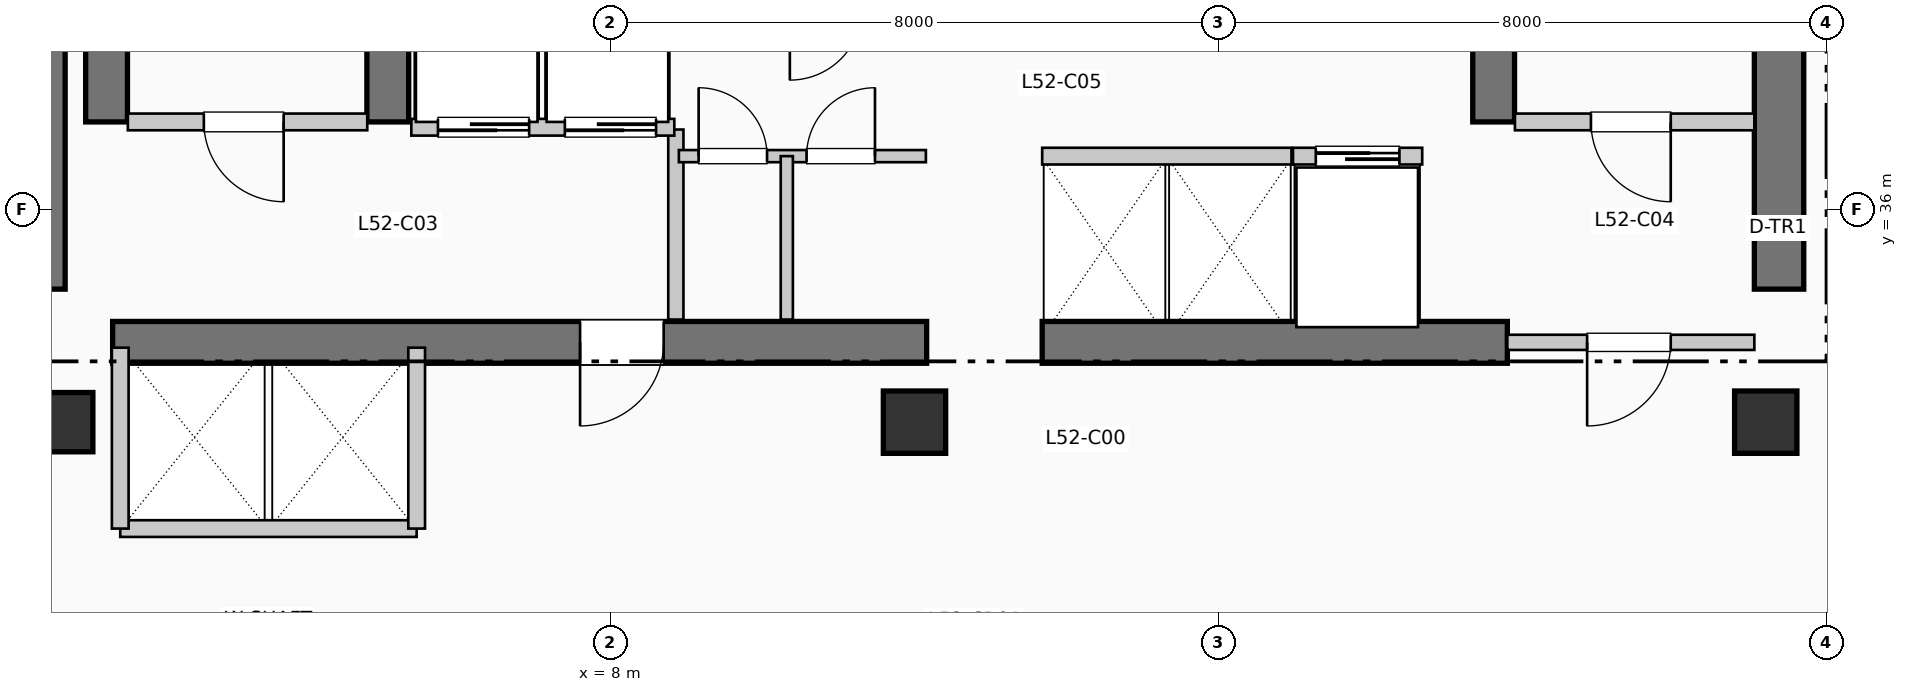
"""IFC4 building model, lengths in metres.
Left out: names, types, materials, properties, quantities, classifications, styles, units other than length and angle.
Written with IfcOpenShell. Run it as: python <this file> out.ifc"""

import sys

from ifc_helpers import new_model, si_unit, direction, frame, frame_2d, origin, origin_2d, place, context, subcontext, project, spatial, rectangle, extrude, element, fill, save


model = new_model("IFC4")
c1 = context("Model", 3, precision=1e-05, world=origin(), true_north=direction((0.0, 1.0)))
c2 = subcontext(c1, "Body", "Model", "MODEL_VIEW")
j1 = project(units=[si_unit("LENGTHUNIT", "METRE"), si_unit("PLANEANGLEUNIT", "RADIAN")], contexts=[c1])
p1 = place(None, origin())
s1 = spatial("IfcSite", under=j1, at=p1, CompositionType="ELEMENT")
p2 = place(p1, origin())
s2 = spatial("IfcBuilding", under=s1, at=p2, CompositionType="ELEMENT")
p3 = place(p2, frame((0.0, 0.0, 215.16)))
s3 = spatial("IfcBuildingStorey", under=s2, at=p3, CompositionType="ELEMENT", Elevation=215.16)
p4 = place(p3, frame((0.5, 34.95, 0.0), z_axis=(0.0, 0.0, 1.0), x_axis=(0.0, 1.0, 0.0)))
e1 = element("IfcWall", 1, at=p4, inside=s3, PredefinedType="SHEAR", context=c2, shape_type="SweptSolid", body=[
    extrude(rectangle(XDim=7.9, YDim=0.65, at=frame_2d((3.95, 0.0))), origin(), (0.0, 0.0, 1.0), 4.62),
])
p5 = place(p3, frame((23.375, 34.95, 0.0), z_axis=(0.0, 0.0, 1.0), x_axis=(0.0, 1.0, 0.0)))
e2 = element("IfcWall", 2, at=p5, inside=s3, PredefinedType="SHEAR", context=c2, shape_type="SweptSolid", body=[
    extrude(rectangle(XDim=10.64, YDim=0.65, at=frame_2d((5.32, 0.0))), origin(), (0.0, 0.0, 1.0), 4.62),
])
p6 = place(p3, frame((1.45, 34.25, 0.0), z_axis=(0.0, 0.0, 1.0), x_axis=(1.0, 0.0, 0.0)))
e3 = element("IfcWall", 3, at=p6, inside=s3, PredefinedType="SHEAR", context=c2, shape_type="SweptSolid", body=[
    extrude(rectangle(XDim=10.71, YDim=0.55, at=frame_2d((5.355, 0.0))), origin(), (0.0, 0.0, 1.0), 4.62),
])
p7 = place(p6, frame((7.25, 0.0, 0.0), z_axis=(0.0, 0.0, 1.0), x_axis=(-1.0, 0.0, 0.0)))
e4 = element("IfcOpeningElement", 4, at=p7, cuts=e3, PredefinedType="OPENING", context=c2, shape_type="SweptSolid", body=[
    extrude(rectangle(XDim=1.1, YDim=2.15, at=frame_2d((0.55, 1.075))), frame((0.0, 0.285, 0.0), z_axis=(0.0, -1.0, 0.0), x_axis=(1.0, 0.0, 0.0)), (0.0, 0.0, 1.0), 0.57),
])
p8 = place(p3, frame((13.68, 34.25, 0.0), z_axis=(0.0, 0.0, 1.0), x_axis=(1.0, 0.0, 0.0)))
e5 = element("IfcWall", 5, at=p8, inside=s3, PredefinedType="SHEAR", context=c2, shape_type="SweptSolid", body=[
    extrude(rectangle(XDim=6.12, YDim=0.55, at=frame_2d((3.06, 0.0))), origin(), (0.0, 0.0, 1.0), 4.62),
])
for number, where, z_axis, x_axis in (
    (6, (1.37, 37.15, 0.0), (0.0, 0.0, 1.0), (0.0, 1.0, 0.0)),
    (7, (5.07, 37.15, 0.0), (0.0, 0.0, 1.0), (0.0, 1.0, 0.0)),
    (8, (19.62, 37.15, 0.0), (0.0, 0.0, 1.0), (0.0, 1.0, 0.0)),
):
    element("IfcWall", number, at=place(p3, frame(where, z_axis=z_axis, x_axis=x_axis)), inside=s3, PredefinedType="SHEAR", context=c2, shape_type="SweptSolid", body=[
        extrude(rectangle(XDim=7.89, YDim=0.55, at=frame_2d((3.945, 0.0))), origin(), (0.0, 0.0, 1.0), 4.62),
    ])
p9 = place(p3, frame((0.8, 33.2, 0.0), z_axis=(0.0, 0.0, 1.0), x_axis=(1.0, 0.0, 0.0)))
e9 = element("IfcColumn", 9, at=p9, inside=s3, PredefinedType="COLUMN", context=c2, shape_type="SweptSolid", body=[
    extrude(rectangle(XDim=0.78, YDim=0.78, at=origin_2d()), origin(), (0.0, 0.0, 1.0), 4.62),
])
for number, where, z_axis, x_axis in (
    (10, (12.0, 33.2, 0.0), (0.0, 0.0, 1.0), (1.0, 0.0, 0.0)),
    (11, (23.2, 33.2, 0.0), (0.0, 0.0, 1.0), (1.0, 0.0, 0.0)),
):
    element("IfcColumn", number, at=place(p3, frame(where, z_axis=z_axis, x_axis=x_axis)), inside=s3, PredefinedType="COLUMN", context=c2, shape_type="SweptSolid", body=[
        extrude(rectangle(XDim=0.82, YDim=0.82, at=origin_2d()), origin(), (0.0, 0.0, 1.0), 4.62),
    ])
p10 = place(p3, frame((1.65, 37.15, 0.0), z_axis=(0.0, 0.0, 1.0), x_axis=(1.0, 0.0, 0.0)))
e12 = element("IfcWall", 12, at=p10, inside=s3, PredefinedType="PARTITIONING", context=c2, shape_type="SweptSolid", body=[
    extrude(rectangle(XDim=3.15, YDim=0.22, at=frame_2d((1.575, 0.0))), origin(), (0.0, 0.0, 1.0), 4.37),
])
p11 = place(p10, frame((2.05, 0.0, 0.0), z_axis=(0.0, 0.0, 1.0), x_axis=(-1.0, 0.0, 0.0)))
e13 = element("IfcOpeningElement", 13, at=p11, cuts=e12, PredefinedType="OPENING", context=c2, shape_type="SweptSolid", body=[
    extrude(rectangle(XDim=1.05, YDim=2.15, at=frame_2d((0.525, 1.075))), frame((0.0, 0.12, 0.0), z_axis=(0.0, -1.0, 0.0), x_axis=(1.0, 0.0, 0.0)), (0.0, 0.0, 1.0), 0.24),
])
p12 = place(p3, frame((8.86, 34.55, 0.0), z_axis=(0.0, 0.0, 1.0), x_axis=(0.0, 1.0, 0.0)))
e14 = element("IfcWall", 14, at=p12, inside=s3, PredefinedType="PARTITIONING", context=c2, shape_type="SweptSolid", body=[
    extrude(rectangle(XDim=2.5, YDim=0.2, at=frame_2d((1.25, 0.0))), origin(), (0.0, 0.0, 1.0), 4.37),
])
p13 = place(p3, frame((19.9, 37.15, 0.0), z_axis=(0.0, 0.0, 1.0), x_axis=(1.0, 0.0, 0.0)))
e15 = element("IfcWall", 15, at=p13, inside=s3, PredefinedType="PARTITIONING", context=c2, shape_type="SweptSolid", body=[
    extrude(rectangle(XDim=3.15, YDim=0.22, at=frame_2d((1.575, 0.0))), origin(), (0.0, 0.0, 1.0), 4.37),
])
p14 = place(p13, frame((2.05, 0.0, 0.0), z_axis=(0.0, 0.0, 1.0), x_axis=(-1.0, 0.0, 0.0)))
e16 = element("IfcOpeningElement", 16, at=p14, cuts=e15, PredefinedType="OPENING", context=c2, shape_type="SweptSolid", body=[
    extrude(rectangle(XDim=1.05, YDim=2.15, at=frame_2d((0.525, 1.075))), frame((0.0, 0.12, 0.0), z_axis=(0.0, -1.0, 0.0), x_axis=(1.0, 0.0, 0.0)), (0.0, 0.0, 1.0), 0.24),
])
p15 = place(p3, frame((19.8, 34.25, 0.0), z_axis=(0.0, 0.0, 1.0), x_axis=(1.0, 0.0, 0.0)))
e17 = element("IfcWall", 17, at=p15, inside=s3, PredefinedType="PARTITIONING", context=c2, shape_type="SweptSolid", body=[
    extrude(rectangle(XDim=3.25, YDim=0.2, at=frame_2d((1.625, 0.0))), origin(), (0.0, 0.0, 1.0), 4.37),
])
p16 = place(p15, frame((2.15, 0.0, 0.0), z_axis=(0.0, 0.0, 1.0), x_axis=(-1.0, 0.0, 0.0)))
e18 = element("IfcOpeningElement", 18, at=p16, cuts=e17, PredefinedType="OPENING", context=c2, shape_type="SweptSolid", body=[
    extrude(rectangle(XDim=1.1, YDim=2.15, at=frame_2d((0.55, 1.075))), frame((0.0, 0.11, 0.0), z_axis=(0.0, -1.0, 0.0), x_axis=(1.0, 0.0, 0.0)), (0.0, 0.0, 1.0), 0.22),
])
p17 = place(p3, frame((5.38, 37.08, 0.0), z_axis=(0.0, 0.0, 1.0), x_axis=(1.0, 0.0, 0.0)))
e19 = element("IfcWall", 19, at=p17, inside=s3, PredefinedType="PARTITIONING", context=c2, shape_type="SweptSolid", body=[
    extrude(rectangle(XDim=3.46, YDim=0.22, at=frame_2d((1.73, 0.0))), origin(), (0.0, 0.0, 1.0), 4.37),
])
p18 = place(p17, frame((1.55, 0.0, 0.0), z_axis=(0.0, 0.0, 1.0), x_axis=(-1.0, 0.0, 0.0)))
e20 = element("IfcOpeningElement", 20, at=p18, cuts=e19, PredefinedType="OPENING", context=c2, shape_type="SweptSolid", body=[
    extrude(rectangle(XDim=1.2, YDim=2.2, at=frame_2d((0.6, 1.1))), frame((0.0, 0.12, 0.0), z_axis=(0.0, -1.0, 0.0), x_axis=(1.0, 0.0, 0.0)), (0.0, 0.0, 1.0), 0.24),
])
p19 = place(p17, frame((3.22, 0.0, 0.0), z_axis=(0.0, 0.0, 1.0), x_axis=(-1.0, 0.0, 0.0)))
e21 = element("IfcOpeningElement", 21, at=p19, cuts=e19, PredefinedType="OPENING", context=c2, shape_type="SweptSolid", body=[
    extrude(rectangle(XDim=1.2, YDim=2.2, at=frame_2d((0.6, 1.1))), frame((0.0, 0.12, 0.0), z_axis=(0.0, -1.0, 0.0), x_axis=(1.0, 0.0, 0.0)), (0.0, 0.0, 1.0), 0.24),
])
p20 = place(p3, frame((1.55, 31.8, 0.0), z_axis=(0.0, 0.0, 1.0), x_axis=(1.0, 0.0, 0.0)))
e22 = element("IfcWall", 22, at=p20, inside=s3, PredefinedType="PARTITIONING", context=c2, shape_type="SweptSolid", body=[
    extrude(rectangle(XDim=3.9, YDim=0.22, at=frame_2d((1.95, 0.0))), origin(), (0.0, 0.0, 1.0), 4.37),
])
for number, where, z_axis, x_axis in (
    (23, (1.55, 31.8, 0.0), (0.0, 0.0, 1.0), (0.0, 1.0, 0.0)),
    (24, (5.45, 31.8, 0.0), (0.0, 0.0, 1.0), (0.0, 1.0, 0.0)),
):
    element("IfcWall", number, at=place(p3, frame(where, z_axis=z_axis, x_axis=x_axis)), inside=s3, PredefinedType="PARTITIONING", context=c2, shape_type="SweptSolid", body=[
        extrude(rectangle(XDim=2.38, YDim=0.22, at=frame_2d((1.19, 0.0))), origin(), (0.0, 0.0, 1.0), 4.37),
    ])
p21 = place(p3, frame((8.9, 36.7, 0.0), z_axis=(0.0, 0.0, 1.0), x_axis=(1.0, 0.0, 0.0)))
e25 = element("IfcWall", 25, at=p21, inside=s3, PredefinedType="PARTITIONING", context=c2, shape_type="SweptSolid", body=[
    extrude(rectangle(XDim=3.25, YDim=0.16, at=frame_2d((1.625, 0.0))), origin(), (0.0, 0.0, 1.0), 4.37),
])
p22 = place(p21, frame((0.26, 0.0, 0.0)))
e26 = element("IfcOpeningElement", 26, at=p22, cuts=e25, PredefinedType="OPENING", context=c2, shape_type="SweptSolid", body=[
    extrude(rectangle(XDim=0.9, YDim=2.15, at=frame_2d((0.45, 1.075))), frame((0.0, 0.09, 0.0), z_axis=(0.0, -1.0, 0.0), x_axis=(1.0, 0.0, 0.0)), (0.0, 0.0, 1.0), 0.18),
])
p23 = place(p21, frame((1.68, 0.0, 0.0)))
e27 = element("IfcOpeningElement", 27, at=p23, cuts=e25, PredefinedType="OPENING", context=c2, shape_type="SweptSolid", body=[
    extrude(rectangle(XDim=0.9, YDim=2.15, at=frame_2d((0.45, 1.075))), frame((0.0, 0.09, 0.0), z_axis=(0.0, -1.0, 0.0), x_axis=(1.0, 0.0, 0.0)), (0.0, 0.0, 1.0), 0.18),
])
p24 = place(p3, frame((10.32, 34.55, 0.0), z_axis=(0.0, 0.0, 1.0), x_axis=(0.0, 1.0, 0.0)))
e28 = element("IfcWall", 28, at=p24, inside=s3, PredefinedType="PARTITIONING", context=c2, shape_type="SweptSolid", body=[
    extrude(rectangle(XDim=2.15, YDim=0.16, at=frame_2d((1.075, 0.0))), origin(), (0.0, 0.0, 1.0), 4.37),
])
p25 = place(p3, frame((13.68, 36.7, 0.0), z_axis=(0.0, 0.0, 1.0), x_axis=(1.0, 0.0, 0.0)))
e29 = element("IfcWall", 29, at=p25, inside=s3, PredefinedType="PARTITIONING", context=c2, shape_type="SweptSolid", body=[
    extrude(rectangle(XDim=3.28, YDim=0.22, at=frame_2d((1.64, 0.0))), origin(), (0.0, 0.0, 1.0), 4.37),
])
p26 = place(p3, frame((16.98, 36.7, 0.0), z_axis=(0.0, 0.0, 1.0), x_axis=(1.0, 0.0, 0.0)))
e30 = element("IfcWall", 30, at=p26, inside=s3, PredefinedType="PARTITIONING", context=c2, shape_type="SweptSolid", body=[
    extrude(rectangle(XDim=1.7, YDim=0.22, at=frame_2d((0.85, 0.0))), origin(), (0.0, 0.0, 1.0), 4.37),
])
p27 = place(p26, frame((0.3, 0.0, 0.0)))
e31 = element("IfcOpeningElement", 31, at=p27, cuts=e30, PredefinedType="OPENING", context=c2, shape_type="SweptSolid", body=[
    extrude(rectangle(XDim=1.1, YDim=2.2, at=frame_2d((0.55, 1.1))), frame((0.0, 0.12, 0.0), z_axis=(0.0, -1.0, 0.0), x_axis=(1.0, 0.0, 0.0)), (0.0, 0.0, 1.0), 0.24),
])
p28 = place(p11, origin())
e32 = element("IfcDoor", 32, at=p28, inside=s3, OperationType="SINGLE_SWING_RIGHT", PredefinedType="DOOR", context=c2, shape_type="SweptSolid", body=[
    extrude(rectangle(XDim=1.05, YDim=2.15, at=frame_2d((0.525, 1.075))), frame((0.0, 0.025, 0.0), z_axis=(0.0, -1.0, 0.0), x_axis=(1.0, 0.0, 0.0)), (0.0, 0.0, 1.0), 0.05),
])
fill(e13, e32)
p29 = place(p7, origin())
e33 = element("IfcDoor", 33, at=p29, inside=s3, OperationType="SINGLE_SWING_LEFT", PredefinedType="DOOR", context=c2, shape_type="SweptSolid", body=[
    extrude(rectangle(XDim=1.1, YDim=2.15, at=frame_2d((0.55, 1.075))), frame((0.0, 0.025, 0.0), z_axis=(0.0, -1.0, 0.0), x_axis=(1.0, 0.0, 0.0)), (0.0, 0.0, 1.0), 0.05),
])
fill(e4, e33)
p30 = place(p14, origin())
e34 = element("IfcDoor", 34, at=p30, inside=s3, OperationType="SINGLE_SWING_RIGHT", PredefinedType="DOOR", context=c2, shape_type="SweptSolid", body=[
    extrude(rectangle(XDim=1.05, YDim=2.15, at=frame_2d((0.525, 1.075))), frame((0.0, 0.025, 0.0), z_axis=(0.0, -1.0, 0.0), x_axis=(1.0, 0.0, 0.0)), (0.0, 0.0, 1.0), 0.05),
])
fill(e16, e34)
p31 = place(p16, origin())
e35 = element("IfcDoor", 35, at=p31, inside=s3, OperationType="SINGLE_SWING_LEFT", PredefinedType="DOOR", context=c2, shape_type="SweptSolid", body=[
    extrude(rectangle(XDim=1.1, YDim=2.15, at=frame_2d((0.55, 1.075))), frame((0.0, 0.025, 0.0), z_axis=(0.0, -1.0, 0.0), x_axis=(1.0, 0.0, 0.0)), (0.0, 0.0, 1.0), 0.05),
])
fill(e18, e35)
p32 = place(p18, origin())
e36 = element("IfcDoor", 36, at=p32, inside=s3, OperationType="SLIDING_TO_RIGHT", PredefinedType="DOOR", context=c2, shape_type="SweptSolid", body=[
    extrude(rectangle(XDim=1.2, YDim=2.2, at=frame_2d((0.6, 1.1))), frame((0.0, 0.025, 0.0), z_axis=(0.0, -1.0, 0.0), x_axis=(1.0, 0.0, 0.0)), (0.0, 0.0, 1.0), 0.05),
])
fill(e20, e36)
p33 = place(p19, origin())
e37 = element("IfcDoor", 37, at=p33, inside=s3, OperationType="SLIDING_TO_RIGHT", PredefinedType="DOOR", context=c2, shape_type="SweptSolid", body=[
    extrude(rectangle(XDim=1.2, YDim=2.2, at=frame_2d((0.6, 1.1))), frame((0.0, 0.025, 0.0), z_axis=(0.0, -1.0, 0.0), x_axis=(1.0, 0.0, 0.0)), (0.0, 0.0, 1.0), 0.05),
])
fill(e21, e37)
p34 = place(p22, origin())
e38 = element("IfcDoor", 38, at=p34, inside=s3, OperationType="SINGLE_SWING_LEFT", PredefinedType="DOOR", context=c2, shape_type="SweptSolid", body=[
    extrude(rectangle(XDim=0.9, YDim=2.15, at=frame_2d((0.45, 1.075))), frame((0.0, 0.025, 0.0), z_axis=(0.0, -1.0, 0.0), x_axis=(1.0, 0.0, 0.0)), (0.0, 0.0, 1.0), 0.05),
])
fill(e26, e38)
p35 = place(p23, origin())
e39 = element("IfcDoor", 39, at=p35, inside=s3, OperationType="SINGLE_SWING_RIGHT", PredefinedType="DOOR", context=c2, shape_type="SweptSolid", body=[
    extrude(rectangle(XDim=0.9, YDim=2.15, at=frame_2d((0.45, 1.075))), frame((0.0, 0.025, 0.0), z_axis=(0.0, -1.0, 0.0), x_axis=(1.0, 0.0, 0.0)), (0.0, 0.0, 1.0), 0.05),
])
fill(e27, e39)
p36 = place(p27, origin())
e40 = element("IfcDoor", 40, at=p36, inside=s3, OperationType="SLIDING_TO_LEFT", PredefinedType="DOOR", context=c2, shape_type="SweptSolid", body=[
    extrude(rectangle(XDim=1.1, YDim=2.2, at=frame_2d((0.55, 1.1))), frame((0.0, 0.025, 0.0), z_axis=(0.0, -1.0, 0.0), x_axis=(1.0, 0.0, 0.0)), (0.0, 0.0, 1.0), 0.05),
])
fill(e31, e40)
save(model, sys.argv[1])
